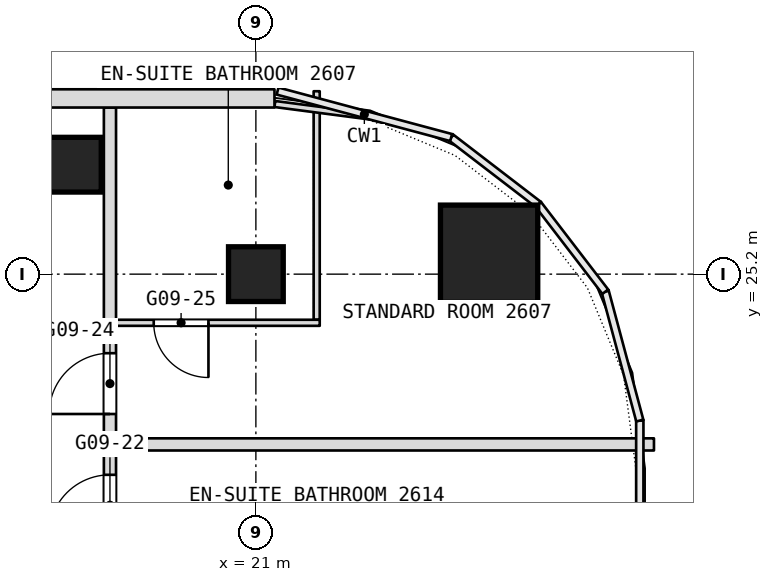
"""IFC4 building model, lengths in metres.
Left out: names, types, materials, properties, quantities, classifications, styles, units other than length and angle.
Written with IfcOpenShell. Run it as: python <this file> out.ifc"""

import sys

from ifc_helpers import new_model, si_unit, direction, frame, frame_2d, origin, origin_2d, place, context, subcontext, project, spatial, rectangle, extrude, element, fill, save


model = new_model("IFC4")
c1 = context("Model", 3, precision=1e-05, world=origin(), true_north=direction((0.0, 1.0)))
c2 = subcontext(c1, "Body", "Model", "MODEL_VIEW")
j1 = project(units=[si_unit("LENGTHUNIT", "METRE"), si_unit("PLANEANGLEUNIT", "RADIAN")], contexts=[c1])
p1 = place(None, origin())
s1 = spatial("IfcSite", under=j1, at=p1, CompositionType="ELEMENT")
p2 = place(p1, origin())
s2 = spatial("IfcBuilding", under=s1, at=p2, CompositionType="ELEMENT")
p3 = place(p2, frame((0.0, 0.0, 119.3)))
s3 = spatial("IfcBuildingStorey", under=s2, at=p3, CompositionType="ELEMENT", Elevation=119.3)
p4 = place(p3, frame((24.835, 25.535, 0.0), z_axis=(0.0, 0.0, 1.0), x_axis=(1.0, 0.0, 0.0)))
e1 = element("IfcColumn", 1, at=p4, inside=s3, PredefinedType="COLUMN", context=c2, shape_type="SweptSolid", body=[
    extrude(rectangle(XDim=1.6, YDim=1.6, at=origin_2d()), origin(), (0.0, 0.0, 1.0), 3.6),
])
for number, where, z_axis, x_axis in (
    (2, (21.0, 25.2, 0.0), (0.0, 0.0, 1.0), (1.0, 0.0, 0.0)),
    (3, (18.007, 27.0, 0.0), (0.0, 0.0, 1.0), (1.0, 0.0, 0.0)),
):
    element("IfcColumn", number, at=place(p3, frame(where, z_axis=z_axis, x_axis=x_axis)), inside=s3, PredefinedType="COLUMN", context=c2, shape_type="SweptSolid", body=[
        extrude(rectangle(XDim=0.9, YDim=0.9, at=origin_2d()), origin(), (0.0, 0.0, 1.0), 3.6),
    ])
p5 = place(p3, frame((22.0, 24.45, 0.0), z_axis=(0.0, 0.0, 1.0), x_axis=(0.0, 1.0, 0.0)))
e4 = element("IfcWall", 4, at=p5, inside=s3, PredefinedType="PARTITIONING", context=c2, shape_type="SweptSolid", body=[
    extrude(rectangle(XDim=3.758, YDim=0.1, at=frame_2d((1.879, 0.0))), origin(), (0.0, 0.0, 1.0), 3.34),
])
p6 = place(p3, frame((18.6, -21.708, 0.0), z_axis=(0.0, 0.0, 1.0), x_axis=(0.0, 1.0, 0.0)))
e5 = element("IfcWall", 5, at=p6, inside=s3, PredefinedType="PARTITIONING", context=c2, shape_type="SweptSolid", body=[
    extrude(rectangle(XDim=49.648, YDim=0.2, at=frame_2d((24.824, 0.0))), origin(), (0.0, 0.0, 1.0), 3.34),
])
p7 = place(p6, frame((2.8, 0.0, 0.0)))
e6 = element("IfcOpeningElement", 6, at=p7, cuts=e5, PredefinedType="OPENING", context=c2, shape_type="SweptSolid", body=[
    extrude(rectangle(XDim=1.0, YDim=2.1, at=frame_2d((0.5, 1.05))), frame((0.0, 0.1, 0.0), z_axis=(0.0, -1.0, 0.0), x_axis=(1.0, 0.0, 0.0)), (0.0, 0.0, 1.0), 0.2),
])
p8 = place(p6, frame((10.658, 0.0, 0.0)))
e7 = element("IfcOpeningElement", 7, at=p8, cuts=e5, PredefinedType="OPENING", context=c2, shape_type="SweptSolid", body=[
    extrude(rectangle(XDim=1.1, YDim=2.1, at=frame_2d((0.55, 1.05))), frame((0.0, 0.1, 0.0), z_axis=(0.0, -1.0, 0.0), x_axis=(1.0, 0.0, 0.0)), (0.0, 0.0, 1.0), 0.2),
])
p9 = place(p6, frame((16.608, 0.0, 0.0)))
e8 = element("IfcOpeningElement", 8, at=p9, cuts=e5, PredefinedType="OPENING", context=c2, shape_type="SweptSolid", body=[
    extrude(rectangle(XDim=1.8, YDim=2.1, at=frame_2d((0.9, 1.05))), frame((0.0, 0.1, 0.0), z_axis=(0.0, -1.0, 0.0), x_axis=(1.0, 0.0, 0.0)), (0.0, 0.0, 1.0), 0.2),
])
p10 = place(p6, frame((24.508, 0.0, 0.0)))
e9 = element("IfcOpeningElement", 9, at=p10, cuts=e5, PredefinedType="OPENING", context=c2, shape_type="SweptSolid", body=[
    extrude(rectangle(XDim=1.0, YDim=2.1, at=frame_2d((0.5, 1.05))), frame((0.0, 0.1, 0.0), z_axis=(0.0, -1.0, 0.0), x_axis=(1.0, 0.0, 0.0)), (0.0, 0.0, 1.0), 0.2),
])
p11 = place(p6, frame((26.308, 0.0, 0.0)))
e10 = element("IfcOpeningElement", 10, at=p11, cuts=e5, PredefinedType="OPENING", context=c2, shape_type="SweptSolid", body=[
    extrude(rectangle(XDim=1.0, YDim=2.1, at=frame_2d((0.5, 1.05))), frame((0.0, 0.1, 0.0), z_axis=(0.0, -1.0, 0.0), x_axis=(1.0, 0.0, 0.0)), (0.0, 0.0, 1.0), 0.2),
])
p12 = place(p6, frame((33.708, 0.0, 0.0)))
e11 = element("IfcOpeningElement", 11, at=p12, cuts=e5, PredefinedType="OPENING", context=c2, shape_type="SweptSolid", body=[
    extrude(rectangle(XDim=1.1, YDim=2.1, at=frame_2d((0.55, 1.05))), frame((0.0, 0.1, 0.0), z_axis=(0.0, -1.0, 0.0), x_axis=(1.0, 0.0, 0.0)), (0.0, 0.0, 1.0), 0.2),
])
p13 = place(p6, frame((42.608, 0.0, 0.0)))
e12 = element("IfcOpeningElement", 12, at=p13, cuts=e5, PredefinedType="OPENING", context=c2, shape_type="SweptSolid", body=[
    extrude(rectangle(XDim=1.0, YDim=2.1, at=frame_2d((0.5, 1.05))), frame((0.0, 0.1, 0.0), z_axis=(0.0, -1.0, 0.0), x_axis=(1.0, 0.0, 0.0)), (0.0, 0.0, 1.0), 0.2),
])
p14 = place(p6, frame((44.608, 0.0, 0.0)))
e13 = element("IfcOpeningElement", 13, at=p14, cuts=e5, PredefinedType="OPENING", context=c2, shape_type="SweptSolid", body=[
    extrude(rectangle(XDim=1.0, YDim=2.1, at=frame_2d((0.5, 1.05))), frame((0.0, 0.1, 0.0), z_axis=(0.0, -1.0, 0.0), x_axis=(1.0, 0.0, 0.0)), (0.0, 0.0, 1.0), 0.2),
])
p15 = place(p3, frame((18.7, 22.4, 0.0), z_axis=(0.0, 0.0, 1.0), x_axis=(1.0, 0.0, 0.0)))
e14 = element("IfcWall", 14, at=p15, inside=s3, PredefinedType="PARTITIONING", context=c2, shape_type="SweptSolid", body=[
    extrude(rectangle(XDim=8.847, YDim=0.2, at=frame_2d((4.424, 0.0))), origin(), (0.0, 0.0, 1.0), 3.34),
])
p16 = place(p3, frame((18.7, 24.4, 0.0), z_axis=(0.0, 0.0, 1.0), x_axis=(1.0, 0.0, 0.0)))
e15 = element("IfcWall", 15, at=p16, inside=s3, PredefinedType="PARTITIONING", context=c2, shape_type="SweptSolid", body=[
    extrude(rectangle(XDim=3.35, YDim=0.1, at=frame_2d((1.675, 0.0))), origin(), (0.0, 0.0, 1.0), 3.34),
])
p17 = place(p16, frame((0.62, 0.0, 0.0)))
e16 = element("IfcOpeningElement", 16, at=p17, cuts=e15, PredefinedType="OPENING", context=c2, shape_type="SweptSolid", body=[
    extrude(rectangle(XDim=0.9, YDim=2.1, at=frame_2d((0.45, 1.05))), frame((0.0, 0.05, 0.0), z_axis=(0.0, -1.0, 0.0), x_axis=(1.0, 0.0, 0.0)), (0.0, 0.0, 1.0), 0.1),
])
p18 = place(p3, frame((21.312, 27.998, 0.0), z_axis=(0.0, 0.0, 1.0), x_axis=(0.991547575144, -0.129743617284, 0.0)))
e17 = element("IfcWall", 17, at=p18, inside=s3, PredefinedType="PARTITIONING", context=c2, shape_type="SweptSolid", body=[
    extrude(rectangle(XDim=1.626, YDim=0.1, at=frame_2d((0.813, 0.0))), origin(), (0.0, 0.0, 1.0), 3.34),
])
p19 = place(p3, frame((21.306, 28.09, 0.0), z_axis=(0.0, 0.0, 1.0), x_axis=(-1.0, 0.0, 0.0)))
e18 = element("IfcWall", 18, at=p19, inside=s3, PredefinedType="NOTDEFINED", context=c2, shape_type="SweptSolid", body=[
    extrude(rectangle(XDim=42.612, YDim=0.3, at=frame_2d((21.306, 0.0))), origin(), (0.0, 0.0, 1.0), 3.6),
])
p20 = place(p19, frame((5.406, 0.0, 0.9)))
e19 = element("IfcOpeningElement", 19, at=p20, cuts=e18, PredefinedType="OPENING", context=c2, shape_type="SweptSolid", body=[
    extrude(rectangle(XDim=2.4, YDim=2.1, at=frame_2d((1.2, 1.05))), frame((0.0, 0.15, 0.0), z_axis=(0.0, -1.0, 0.0), x_axis=(1.0, 0.0, 0.0)), (0.0, 0.0, 1.0), 0.3),
])
p21 = place(p19, frame((9.606, 0.0, 0.9)))
e20 = element("IfcOpeningElement", 20, at=p21, cuts=e18, PredefinedType="OPENING", context=c2, shape_type="SweptSolid", body=[
    extrude(rectangle(XDim=2.4, YDim=2.1, at=frame_2d((1.2, 1.05))), frame((0.0, 0.15, 0.0), z_axis=(0.0, -1.0, 0.0), x_axis=(1.0, 0.0, 0.0)), (0.0, 0.0, 1.0), 0.3),
])
p22 = place(p19, frame((13.806, 0.0, 0.9)))
e21 = element("IfcOpeningElement", 21, at=p22, cuts=e18, PredefinedType="OPENING", context=c2, shape_type="SweptSolid", body=[
    extrude(rectangle(XDim=2.4, YDim=2.1, at=frame_2d((1.2, 1.05))), frame((0.0, 0.15, 0.0), z_axis=(0.0, -1.0, 0.0), x_axis=(1.0, 0.0, 0.0)), (0.0, 0.0, 1.0), 0.3),
])
p23 = place(p19, frame((18.006, 0.0, 0.9)))
e22 = element("IfcOpeningElement", 22, at=p23, cuts=e18, PredefinedType="OPENING", context=c2, shape_type="SweptSolid", body=[
    extrude(rectangle(XDim=2.4, YDim=2.1, at=frame_2d((1.2, 1.05))), frame((0.0, 0.15, 0.0), z_axis=(0.0, -1.0, 0.0), x_axis=(1.0, 0.0, 0.0)), (0.0, 0.0, 1.0), 0.3),
])
p24 = place(p19, frame((22.206, 0.0, 0.9)))
e23 = element("IfcOpeningElement", 23, at=p24, cuts=e18, PredefinedType="OPENING", context=c2, shape_type="SweptSolid", body=[
    extrude(rectangle(XDim=2.4, YDim=2.1, at=frame_2d((1.2, 1.05))), frame((0.0, 0.15, 0.0), z_axis=(0.0, -1.0, 0.0), x_axis=(1.0, 0.0, 0.0)), (0.0, 0.0, 1.0), 0.3),
])
p25 = place(p19, frame((26.406, 0.0, 0.9)))
e24 = element("IfcOpeningElement", 24, at=p25, cuts=e18, PredefinedType="OPENING", context=c2, shape_type="SweptSolid", body=[
    extrude(rectangle(XDim=2.4, YDim=2.1, at=frame_2d((1.2, 1.05))), frame((0.0, 0.15, 0.0), z_axis=(0.0, -1.0, 0.0), x_axis=(1.0, 0.0, 0.0)), (0.0, 0.0, 1.0), 0.3),
])
p26 = place(p19, frame((30.606, 0.0, 0.9)))
e25 = element("IfcOpeningElement", 25, at=p26, cuts=e18, PredefinedType="OPENING", context=c2, shape_type="SweptSolid", body=[
    extrude(rectangle(XDim=2.4, YDim=2.1, at=frame_2d((1.2, 1.05))), frame((0.0, 0.15, 0.0), z_axis=(0.0, -1.0, 0.0), x_axis=(1.0, 0.0, 0.0)), (0.0, 0.0, 1.0), 0.3),
])
p27 = place(p19, frame((34.806, 0.0, 0.9)))
e26 = element("IfcOpeningElement", 26, at=p27, cuts=e18, PredefinedType="OPENING", context=c2, shape_type="SweptSolid", body=[
    extrude(rectangle(XDim=2.4, YDim=2.1, at=frame_2d((1.2, 1.05))), frame((0.0, 0.15, 0.0), z_axis=(0.0, -1.0, 0.0), x_axis=(1.0, 0.0, 0.0)), (0.0, 0.0, 1.0), 0.3),
])
p28 = place(p13, origin())
e27 = element("IfcDoor", 27, at=p28, inside=s3, OperationType="SINGLE_SWING_RIGHT", PredefinedType="DOOR", context=c2, shape_type="SweptSolid", body=[
    extrude(rectangle(XDim=1.0, YDim=2.1, at=frame_2d((0.5, 1.05))), frame((0.0, 0.025, 0.0), z_axis=(0.0, -1.0, 0.0), x_axis=(1.0, 0.0, 0.0)), (0.0, 0.0, 1.0), 0.05),
])
fill(e12, e27)
p29 = place(p14, origin())
e28 = element("IfcDoor", 28, at=p29, inside=s3, OperationType="SINGLE_SWING_RIGHT", PredefinedType="DOOR", context=c2, shape_type="SweptSolid", body=[
    extrude(rectangle(XDim=1.0, YDim=2.1, at=frame_2d((0.5, 1.05))), frame((0.0, 0.025, 0.0), z_axis=(0.0, -1.0, 0.0), x_axis=(1.0, 0.0, 0.0)), (0.0, 0.0, 1.0), 0.05),
])
fill(e13, e28)
p30 = place(p17, origin())
e29 = element("IfcDoor", 29, at=p30, inside=s3, OperationType="SINGLE_SWING_RIGHT", PredefinedType="DOOR", context=c2, shape_type="SweptSolid", body=[
    extrude(rectangle(XDim=0.9, YDim=2.1, at=frame_2d((0.45, 1.05))), frame((0.0, 0.025, 0.0), z_axis=(0.0, -1.0, 0.0), x_axis=(1.0, 0.0, 0.0)), (0.0, 0.0, 1.0), 0.05),
])
fill(e16, e29)
save(model, sys.argv[1])
